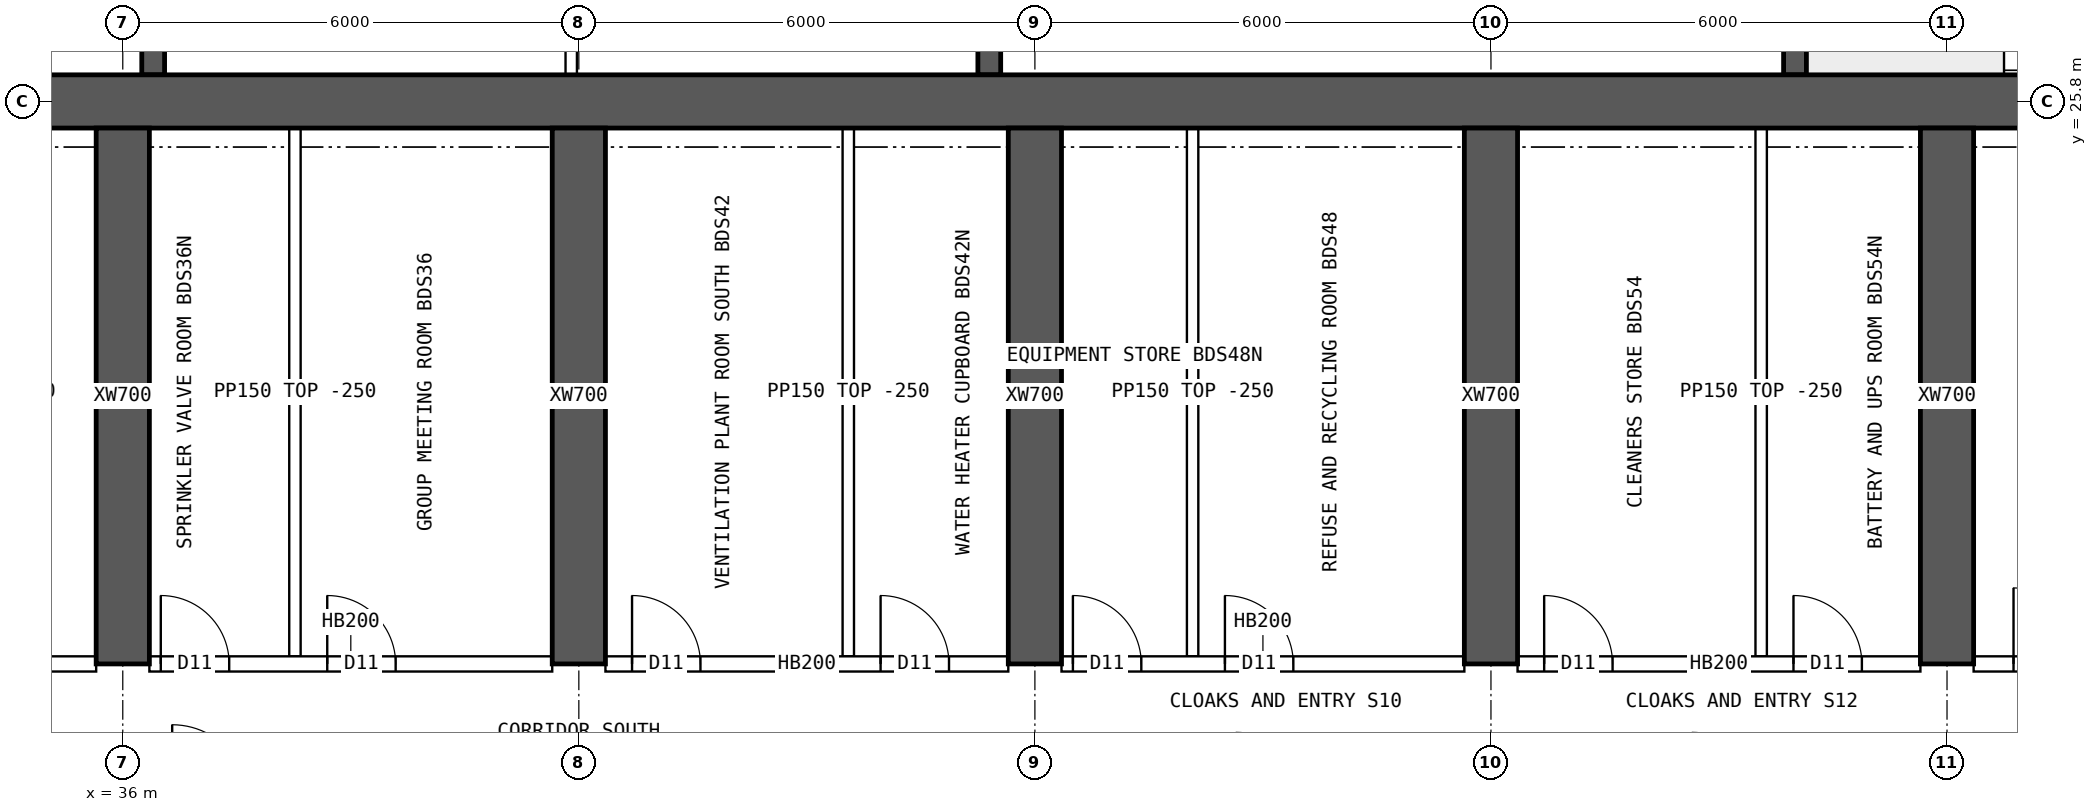
"""IFC4 building model, lengths in metres.
Left out: names, types, materials, properties, quantities, classifications, styles, units other than length and angle.
Written with IfcOpenShell. Run it as: python <this file> out.ifc"""

import sys

from ifc_helpers import new_model, si_unit, direction, frame, frame_2d, origin, place, context, subcontext, project, spatial, rectangle, extrude, element, fill, save


model = new_model("IFC4")
c1 = context("Model", 3, precision=1e-05, world=origin(), true_north=direction((0.0, 1.0)))
c2 = subcontext(c1, "Body", "Model", "MODEL_VIEW")
j1 = project(units=[si_unit("LENGTHUNIT", "METRE"), si_unit("PLANEANGLEUNIT", "RADIAN")], contexts=[c1])
p1 = place(None, origin())
s1 = spatial("IfcSite", under=j1, at=p1, CompositionType="ELEMENT")
p2 = place(p1, origin())
s2 = spatial("IfcBuilding", under=s1, at=p2, CompositionType="ELEMENT")
p3 = place(p2, frame((0.0, 0.0, 246.55)))
s3 = spatial("IfcBuildingStorey", under=s2, at=p3, CompositionType="ELEMENT", Elevation=246.55)
p4 = place(p3, frame((18.0, 25.8, 0.0), z_axis=(0.0, 0.0, 1.0), x_axis=(1.0, 0.0, 0.0)))
e1 = element("IfcWall", 1, at=p4, inside=s3, PredefinedType="SHEAR", context=c2, shape_type="SweptSolid", body=[
    extrude(rectangle(XDim=48.0, YDim=0.7, at=frame_2d((24.0, 0.0))), origin(), (0.0, 0.0, 1.0), 3.75),
])
for number, where, z_axis, x_axis in (
    (2, (58.0, 26.15, 0.0), (0.0, 0.0, 1.0), (0.0, 1.0, 0.0)),
    (3, (36.4, 26.15, 0.0), (0.0, 0.0, 1.0), (0.0, 1.0, 0.0)),
    (4, (47.4, 26.15, 0.0), (0.0, 0.0, 1.0), (0.0, 1.0, 0.0)),
):
    element("IfcWall", number, at=place(p3, frame(where, z_axis=z_axis, x_axis=x_axis)), inside=s3, PredefinedType="SHEAR", context=c2, shape_type="SweptSolid", body=[
        extrude(rectangle(XDim=4.1, YDim=0.3, at=frame_2d((2.05, 0.0))), origin(), (0.0, 0.0, 1.0), 3.75),
    ])
for number, where, z_axis, x_axis in (
    (5, (36.0, 18.4, 0.0), (0.0, 0.0, 1.0), (0.0, 1.0, 0.0)),
    (6, (42.0, 18.4, 0.0), (0.0, 0.0, 1.0), (0.0, 1.0, 0.0)),
    (7, (48.0, 18.4, 0.0), (0.0, 0.0, 1.0), (0.0, 1.0, 0.0)),
    (8, (54.0, 18.4, 0.0), (0.0, 0.0, 1.0), (0.0, 1.0, 0.0)),
    (9, (60.0, 18.4, 0.0), (0.0, 0.0, 1.0), (0.0, 1.0, 0.0)),
):
    element("IfcWall", number, at=place(p3, frame(where, z_axis=z_axis, x_axis=x_axis)), inside=s3, PredefinedType="SHEAR", context=c2, shape_type="SweptSolid", body=[
        extrude(rectangle(XDim=7.05, YDim=0.7, at=frame_2d((3.525, 0.0))), origin(), (0.0, 0.0, 1.0), 3.75),
    ])
p5 = place(p3, frame((41.9, 26.15, 0.0), z_axis=(0.0, 0.0, 1.0), x_axis=(0.0, 1.0, 0.0)))
e10 = element("IfcWall", 10, at=p5, inside=s3, PredefinedType="SOLIDWALL", context=c2, shape_type="SweptSolid", body=[
    extrude(rectangle(XDim=4.1, YDim=0.15, at=frame_2d((2.05, 0.0))), origin(), (0.0, 0.0, 1.0), 3.5),
])
p6 = place(p3, frame((30.35, 18.4, 0.0), z_axis=(0.0, 0.0, 1.0), x_axis=(1.0, 0.0, 0.0)))
e11 = element("IfcWall", 11, at=p6, inside=s3, PredefinedType="SOLIDWALL", context=c2, shape_type="SweptSolid", body=[
    extrude(rectangle(XDim=5.3, YDim=0.2, at=frame_2d((2.65, 0.0))), origin(), (0.0, 0.0, 1.0), 3.5),
])
p7 = place(p6, frame((0.8, 0.0, 0.0)))
e12 = element("IfcOpeningElement", 12, at=p7, cuts=e11, PredefinedType="OPENING", context=c2, shape_type="SweptSolid", body=[
    extrude(rectangle(XDim=1.0, YDim=2.1, at=frame_2d((0.5, 1.05))), frame((0.0, 0.11, 0.0), z_axis=(0.0, -1.0, 0.0), x_axis=(1.0, 0.0, 0.0)), (0.0, 0.0, 1.0), 0.22),
])
p8 = place(p3, frame((36.35, 18.4, 0.0), z_axis=(0.0, 0.0, 1.0), x_axis=(1.0, 0.0, 0.0)))
e13 = element("IfcWall", 13, at=p8, inside=s3, PredefinedType="SOLIDWALL", context=c2, shape_type="SweptSolid", body=[
    extrude(rectangle(XDim=5.3, YDim=0.2, at=frame_2d((2.65, 0.0))), origin(), (0.0, 0.0, 1.0), 3.5),
])
p9 = place(p8, frame((0.15, 0.0, 0.0)))
e14 = element("IfcOpeningElement", 14, at=p9, cuts=e13, PredefinedType="OPENING", context=c2, shape_type="SweptSolid", body=[
    extrude(rectangle(XDim=0.9, YDim=2.1, at=frame_2d((0.45, 1.05))), frame((0.0, 0.11, 0.0), z_axis=(0.0, -1.0, 0.0), x_axis=(1.0, 0.0, 0.0)), (0.0, 0.0, 1.0), 0.22),
])
p10 = place(p8, frame((2.34, 0.0, 0.0)))
e15 = element("IfcOpeningElement", 15, at=p10, cuts=e13, PredefinedType="OPENING", context=c2, shape_type="SweptSolid", body=[
    extrude(rectangle(XDim=0.9, YDim=2.1, at=frame_2d((0.45, 1.05))), frame((0.0, 0.11, 0.0), z_axis=(0.0, -1.0, 0.0), x_axis=(1.0, 0.0, 0.0)), (0.0, 0.0, 1.0), 0.22),
])
p11 = place(p3, frame((42.35, 18.4, 0.0), z_axis=(0.0, 0.0, 1.0), x_axis=(1.0, 0.0, 0.0)))
e16 = element("IfcWall", 16, at=p11, inside=s3, PredefinedType="SOLIDWALL", context=c2, shape_type="SweptSolid", body=[
    extrude(rectangle(XDim=5.3, YDim=0.2, at=frame_2d((2.65, 0.0))), origin(), (0.0, 0.0, 1.0), 3.5),
])
p12 = place(p11, frame((0.35, 0.0, 0.0)))
e17 = element("IfcOpeningElement", 17, at=p12, cuts=e16, PredefinedType="OPENING", context=c2, shape_type="SweptSolid", body=[
    extrude(rectangle(XDim=0.9, YDim=2.1, at=frame_2d((0.45, 1.05))), frame((0.0, 0.11, 0.0), z_axis=(0.0, -1.0, 0.0), x_axis=(1.0, 0.0, 0.0)), (0.0, 0.0, 1.0), 0.22),
])
p13 = place(p11, frame((3.62, 0.0, 0.0)))
e18 = element("IfcOpeningElement", 18, at=p13, cuts=e16, PredefinedType="OPENING", context=c2, shape_type="SweptSolid", body=[
    extrude(rectangle(XDim=0.9, YDim=2.1, at=frame_2d((0.45, 1.05))), frame((0.0, 0.11, 0.0), z_axis=(0.0, -1.0, 0.0), x_axis=(1.0, 0.0, 0.0)), (0.0, 0.0, 1.0), 0.22),
])
p14 = place(p3, frame((48.35, 18.4, 0.0), z_axis=(0.0, 0.0, 1.0), x_axis=(1.0, 0.0, 0.0)))
e19 = element("IfcWall", 19, at=p14, inside=s3, PredefinedType="SOLIDWALL", context=c2, shape_type="SweptSolid", body=[
    extrude(rectangle(XDim=5.3, YDim=0.2, at=frame_2d((2.65, 0.0))), origin(), (0.0, 0.0, 1.0), 3.5),
])
p15 = place(p14, frame((0.15, 0.0, 0.0)))
e20 = element("IfcOpeningElement", 20, at=p15, cuts=e19, PredefinedType="OPENING", context=c2, shape_type="SweptSolid", body=[
    extrude(rectangle(XDim=0.9, YDim=2.1, at=frame_2d((0.45, 1.05))), frame((0.0, 0.11, 0.0), z_axis=(0.0, -1.0, 0.0), x_axis=(1.0, 0.0, 0.0)), (0.0, 0.0, 1.0), 0.22),
])
p16 = place(p14, frame((2.15, 0.0, 0.0)))
e21 = element("IfcOpeningElement", 21, at=p16, cuts=e19, PredefinedType="OPENING", context=c2, shape_type="SweptSolid", body=[
    extrude(rectangle(XDim=0.9, YDim=2.1, at=frame_2d((0.45, 1.05))), frame((0.0, 0.11, 0.0), z_axis=(0.0, -1.0, 0.0), x_axis=(1.0, 0.0, 0.0)), (0.0, 0.0, 1.0), 0.22),
])
p17 = place(p3, frame((54.35, 18.4, 0.0), z_axis=(0.0, 0.0, 1.0), x_axis=(1.0, 0.0, 0.0)))
e22 = element("IfcWall", 22, at=p17, inside=s3, PredefinedType="SOLIDWALL", context=c2, shape_type="SweptSolid", body=[
    extrude(rectangle(XDim=5.3, YDim=0.2, at=frame_2d((2.65, 0.0))), origin(), (0.0, 0.0, 1.0), 3.5),
])
p18 = place(p17, frame((0.35, 0.0, 0.0)))
e23 = element("IfcOpeningElement", 23, at=p18, cuts=e22, PredefinedType="OPENING", context=c2, shape_type="SweptSolid", body=[
    extrude(rectangle(XDim=0.9, YDim=2.1, at=frame_2d((0.45, 1.05))), frame((0.0, 0.11, 0.0), z_axis=(0.0, -1.0, 0.0), x_axis=(1.0, 0.0, 0.0)), (0.0, 0.0, 1.0), 0.22),
])
p19 = place(p17, frame((3.63, 0.0, 0.0)))
e24 = element("IfcOpeningElement", 24, at=p19, cuts=e22, PredefinedType="OPENING", context=c2, shape_type="SweptSolid", body=[
    extrude(rectangle(XDim=0.9, YDim=2.1, at=frame_2d((0.45, 1.05))), frame((0.0, 0.11, 0.0), z_axis=(0.0, -1.0, 0.0), x_axis=(1.0, 0.0, 0.0)), (0.0, 0.0, 1.0), 0.22),
])
p20 = place(p3, frame((60.35, 18.4, 0.0), z_axis=(0.0, 0.0, 1.0), x_axis=(1.0, 0.0, 0.0)))
e25 = element("IfcWall", 25, at=p20, inside=s3, PredefinedType="SOLIDWALL", context=c2, shape_type="SweptSolid", body=[
    extrude(rectangle(XDim=5.3, YDim=0.2, at=frame_2d((2.65, 0.0))), origin(), (0.0, 0.0, 1.0), 3.5),
])
p21 = place(p20, frame((0.525, 0.0, 0.0)))
e26 = element("IfcOpeningElement", 26, at=p21, cuts=e25, PredefinedType="OPENING", context=c2, shape_type="SweptSolid", body=[
    extrude(rectangle(XDim=1.0, YDim=2.1, at=frame_2d((0.5, 1.05))), frame((0.0, 0.11, 0.0), z_axis=(0.0, -1.0, 0.0), x_axis=(1.0, 0.0, 0.0)), (0.0, 0.0, 1.0), 0.22),
])
for number, where, z_axis, x_axis in (
    (27, (38.265, 18.5, 0.0), (0.0, 0.0, 1.0), (0.0, 1.0, 0.0)),
    (28, (45.545, 18.5, 0.0), (0.0, 0.0, 1.0), (0.0, 1.0, 0.0)),
    (29, (50.075, 18.5, 0.0), (0.0, 0.0, 1.0), (0.0, 1.0, 0.0)),
    (30, (57.555, 18.5, 0.0), (0.0, 0.0, 1.0), (0.0, 1.0, 0.0)),
):
    element("IfcWall", number, at=place(p3, frame(where, z_axis=z_axis, x_axis=x_axis)), inside=s3, PredefinedType="PARTITIONING", context=c2, shape_type="SweptSolid", body=[
        extrude(rectangle(XDim=6.95, YDim=0.15, at=frame_2d((3.475, 0.0))), origin(), (0.0, 0.0, 1.0), 3.5),
    ])
p22 = place(p9, origin())
e31 = element("IfcDoor", 31, at=p22, inside=s3, OperationType="SINGLE_SWING_LEFT", PredefinedType="DOOR", context=c2, shape_type="SweptSolid", body=[
    extrude(rectangle(XDim=0.9, YDim=2.1, at=frame_2d((0.45, 1.05))), frame((0.0, 0.025, 0.0), z_axis=(0.0, -1.0, 0.0), x_axis=(1.0, 0.0, 0.0)), (0.0, 0.0, 1.0), 0.05),
])
fill(e14, e31)
p23 = place(p10, origin())
e32 = element("IfcDoor", 32, at=p23, inside=s3, OperationType="SINGLE_SWING_LEFT", PredefinedType="DOOR", context=c2, shape_type="SweptSolid", body=[
    extrude(rectangle(XDim=0.9, YDim=2.1, at=frame_2d((0.45, 1.05))), frame((0.0, 0.025, 0.0), z_axis=(0.0, -1.0, 0.0), x_axis=(1.0, 0.0, 0.0)), (0.0, 0.0, 1.0), 0.05),
])
fill(e15, e32)
p24 = place(p12, origin())
e33 = element("IfcDoor", 33, at=p24, inside=s3, OperationType="SINGLE_SWING_LEFT", PredefinedType="DOOR", context=c2, shape_type="SweptSolid", body=[
    extrude(rectangle(XDim=0.9, YDim=2.1, at=frame_2d((0.45, 1.05))), frame((0.0, 0.025, 0.0), z_axis=(0.0, -1.0, 0.0), x_axis=(1.0, 0.0, 0.0)), (0.0, 0.0, 1.0), 0.05),
])
fill(e17, e33)
p25 = place(p13, origin())
e34 = element("IfcDoor", 34, at=p25, inside=s3, OperationType="SINGLE_SWING_LEFT", PredefinedType="DOOR", context=c2, shape_type="SweptSolid", body=[
    extrude(rectangle(XDim=0.9, YDim=2.1, at=frame_2d((0.45, 1.05))), frame((0.0, 0.025, 0.0), z_axis=(0.0, -1.0, 0.0), x_axis=(1.0, 0.0, 0.0)), (0.0, 0.0, 1.0), 0.05),
])
fill(e18, e34)
p26 = place(p15, origin())
e35 = element("IfcDoor", 35, at=p26, inside=s3, OperationType="SINGLE_SWING_LEFT", PredefinedType="DOOR", context=c2, shape_type="SweptSolid", body=[
    extrude(rectangle(XDim=0.9, YDim=2.1, at=frame_2d((0.45, 1.05))), frame((0.0, 0.025, 0.0), z_axis=(0.0, -1.0, 0.0), x_axis=(1.0, 0.0, 0.0)), (0.0, 0.0, 1.0), 0.05),
])
fill(e20, e35)
p27 = place(p16, origin())
e36 = element("IfcDoor", 36, at=p27, inside=s3, OperationType="SINGLE_SWING_LEFT", PredefinedType="DOOR", context=c2, shape_type="SweptSolid", body=[
    extrude(rectangle(XDim=0.9, YDim=2.1, at=frame_2d((0.45, 1.05))), frame((0.0, 0.025, 0.0), z_axis=(0.0, -1.0, 0.0), x_axis=(1.0, 0.0, 0.0)), (0.0, 0.0, 1.0), 0.05),
])
fill(e21, e36)
p28 = place(p18, origin())
e37 = element("IfcDoor", 37, at=p28, inside=s3, OperationType="SINGLE_SWING_LEFT", PredefinedType="DOOR", context=c2, shape_type="SweptSolid", body=[
    extrude(rectangle(XDim=0.9, YDim=2.1, at=frame_2d((0.45, 1.05))), frame((0.0, 0.025, 0.0), z_axis=(0.0, -1.0, 0.0), x_axis=(1.0, 0.0, 0.0)), (0.0, 0.0, 1.0), 0.05),
])
fill(e23, e37)
p29 = place(p19, origin())
e38 = element("IfcDoor", 38, at=p29, inside=s3, OperationType="SINGLE_SWING_LEFT", PredefinedType="DOOR", context=c2, shape_type="SweptSolid", body=[
    extrude(rectangle(XDim=0.9, YDim=2.1, at=frame_2d((0.45, 1.05))), frame((0.0, 0.025, 0.0), z_axis=(0.0, -1.0, 0.0), x_axis=(1.0, 0.0, 0.0)), (0.0, 0.0, 1.0), 0.05),
])
fill(e24, e38)
p30 = place(p21, origin())
e39 = element("IfcDoor", 39, at=p30, inside=s3, OperationType="SINGLE_SWING_LEFT", PredefinedType="DOOR", context=c2, shape_type="SweptSolid", body=[
    extrude(rectangle(XDim=1.0, YDim=2.1, at=frame_2d((0.5, 1.05))), frame((0.0, 0.025, 0.0), z_axis=(0.0, -1.0, 0.0), x_axis=(1.0, 0.0, 0.0)), (0.0, 0.0, 1.0), 0.05),
])
fill(e26, e39)
save(model, sys.argv[1])
